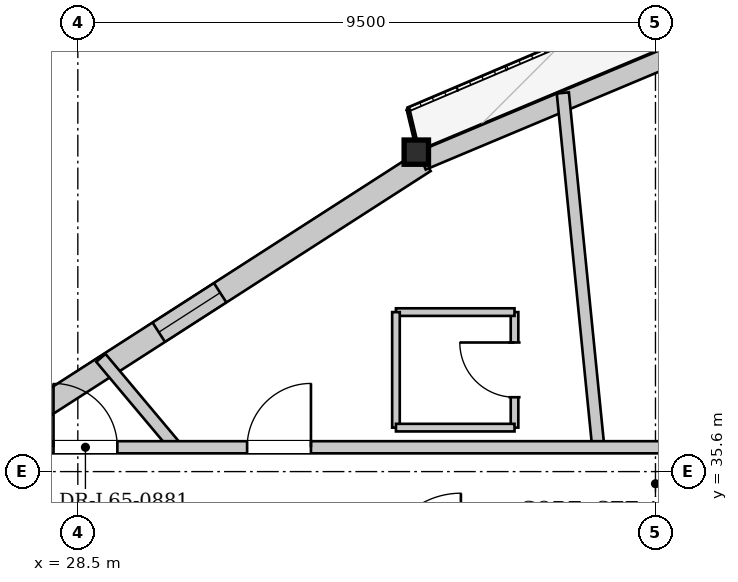
"""IFC4 building model, lengths in metres.
Left out: names, types, materials, properties, quantities, classifications, styles, units other than length and angle.
Written with IfcOpenShell. Run it as: python <this file> out.ifc"""

import sys

from ifc_helpers import new_model, si_unit, direction, frame, frame_2d, origin, origin_2d, place, context, subcontext, project, spatial, rectangle, i_section, extrude, source, transform, mapped, element, fill, save


model = new_model("IFC4")
c1 = context("Model", 3, precision=1e-05, world=origin(), true_north=direction((0.0, 1.0)))
c2 = subcontext(c1, "Body", "Model", "MODEL_VIEW")
j1 = project(units=[si_unit("LENGTHUNIT", "METRE"), si_unit("PLANEANGLEUNIT", "RADIAN")], contexts=[c1])
p1 = place(None, origin())
s1 = spatial("IfcSite", under=j1, at=p1, CompositionType="ELEMENT")
p2 = place(p1, origin())
s2 = spatial("IfcBuilding", under=s1, at=p2, CompositionType="ELEMENT")
p3 = place(p2, frame((0.0, 0.0, 245.3)))
s3 = spatial("IfcBuildingStorey", under=s2, at=p3, CompositionType="ELEMENT", Elevation=245.3)
m1 = source(origin(), c2, "Body", "SweptSolid", [
    extrude(i_section(OverallWidth=0.401, OverallDepth=0.399, WebThickness=0.022, FlangeThickness=0.034, at=origin_2d()), origin(), (0.0, 0.0, 1.0), 3.436),
])
p4 = place(p3, frame((34.098, 40.862, 0.0), z_axis=(-0.018120467412, -0.004974245956, 0.999823437182), x_axis=(0.264716981781, -0.964326147917, 0.0)))
e1 = element("IfcColumn", 1, at=p4, inside=s3, PredefinedType="COLUMN", context=c2, shape_type="MappedRepresentation", body=[
    mapped(m1, transform((0.0, 0.0, 0.0), x_axis=(1.0, 0.0, 0.0), y_axis=(0.0, 1.0, 0.0), z_axis=(0.0, 0.0, 1.0), scale=1.0)),
])
p5 = place(p3, frame((15.593, 28.735, 0.0), z_axis=(0.0, 0.0, 1.0), x_axis=(0.841061212788, 0.54093995632, 0.0)))
e2 = element("IfcWall", 2, at=p5, inside=s3, PredefinedType="SOLIDWALL", context=c2, shape_type="SweptSolid", body=[
    extrude(rectangle(XDim=22.124, YDim=0.38, at=frame_2d((11.062, 0.0))), origin(), (0.0, 0.0, 1.0), 2.872),
])
p6 = place(p5, frame((5.595, 0.0, 0.65)))
e3 = element("IfcOpeningElement", 3, at=p6, cuts=e2, PredefinedType="OPENING", context=c2, shape_type="SweptSolid", body=[
    extrude(rectangle(XDim=1.2, YDim=1.5, at=frame_2d((0.6, 0.75))), frame((0.0, 0.2, 0.0), z_axis=(0.0, -1.0, 0.0), x_axis=(1.0, 0.0, 0.0)), (0.0, 0.0, 1.0), 0.4),
])
p7 = place(p5, frame((16.929, 0.0, 0.65)))
e4 = element("IfcOpeningElement", 4, at=p7, cuts=e2, PredefinedType="OPENING", context=c2, shape_type="SweptSolid", body=[
    extrude(rectangle(XDim=1.2, YDim=1.5, at=frame_2d((0.6, 0.75))), frame((0.0, 0.2, 0.0), z_axis=(0.0, -1.0, 0.0), x_axis=(1.0, 0.0, 0.0)), (0.0, 0.0, 1.0), 0.4),
])
p8 = place(p3, frame((34.16, 40.715, 0.0), z_axis=(0.0, 0.0, 1.0), x_axis=(0.922135211304, 0.386867744937, 0.0)))
e5 = element("IfcWall", 5, at=p8, inside=s3, PredefinedType="SOLIDWALL", context=c2, shape_type="SweptSolid", body=[
    extrude(rectangle(XDim=22.124, YDim=0.32, at=frame_2d((11.062, 0.0))), origin(), (0.0, 0.0, 1.0), 2.872),
])
p9 = place(p8, frame((6.33, 0.0, 0.0)))
e6 = element("IfcOpeningElement", 6, at=p9, cuts=e5, PredefinedType="OPENING", context=c2, shape_type="SweptSolid", body=[
    extrude(rectangle(XDim=1.5, YDim=2.3, at=frame_2d((0.75, 1.15))), frame((0.0, 0.17, 0.0), z_axis=(0.0, -1.0, 0.0), x_axis=(1.0, 0.0, 0.0)), (0.0, 0.0, 1.0), 0.34),
])
p10 = place(p8, frame((17.272, 0.0, 0.402)))
e7 = element("IfcOpeningElement", 7, at=p10, cuts=e5, PredefinedType="OPENING", context=c2, shape_type="SweptSolid", body=[
    extrude(rectangle(XDim=2.6, YDim=2.35, at=frame_2d((1.3, 1.175))), frame((0.0, 0.17, 0.0), z_axis=(0.0, -1.0, 0.0), x_axis=(1.0, 0.0, 0.0)), (0.0, 0.0, 1.0), 0.34),
])
p11 = place(p3, frame((37.059, 36.0, 0.0), z_axis=(0.0, 0.0, 1.0), x_axis=(-0.099549120858, 0.99503264898, 0.0)))
e8 = element("IfcWall", 8, at=p11, inside=s3, PredefinedType="PARTITIONING", context=c2, shape_type="SweptSolid", body=[
    extrude(rectangle(XDim=5.856, YDim=0.2, at=frame_2d((2.928, 0.0))), origin(), (0.0, 0.0, 1.0), 3.38),
])
p12 = place(p3, frame((30.113, 36.0, 0.0), z_axis=(0.0, 0.0, 1.0), x_axis=(-0.642845923279, 0.765995508423, 0.0)))
e9 = element("IfcWall", 9, at=p12, inside=s3, PredefinedType="PARTITIONING", context=c2, shape_type="SweptSolid", body=[
    extrude(rectangle(XDim=1.919, YDim=0.2, at=frame_2d((0.959, 0.0))), origin(), (0.0, 0.0, 1.0), 3.38),
])
p13 = place(p3, frame((35.682, 36.323, 0.0), z_axis=(0.0, 0.0, 1.0), x_axis=(0.0, 1.0, 0.0)))
e10 = element("IfcWall", 10, at=p13, inside=s3, PredefinedType="PARTITIONING", context=c2, shape_type="SweptSolid", body=[
    extrude(rectangle(XDim=1.9, YDim=0.125, at=frame_2d((0.95, 0.0))), origin(), (0.0, 0.0, 1.0), 3.38),
])
p14 = place(p13, frame((0.5, 0.0, 0.0)))
e11 = element("IfcOpeningElement", 11, at=p14, cuts=e10, PredefinedType="OPENING", context=c2, shape_type="SweptSolid", body=[
    extrude(rectangle(XDim=0.9, YDim=2.1, at=frame_2d((0.45, 1.05))), frame((0.0, 0.073, 0.0), z_axis=(0.0, -1.0, 0.0), x_axis=(1.0, 0.0, 0.0)), (0.0, 0.0, 1.0), 0.145),
])
p15 = place(p3, frame((35.682, 38.223, 0.0), z_axis=(0.0, 0.0, 1.0), x_axis=(-1.0, 0.0, 0.0)))
e12 = element("IfcWall", 12, at=p15, inside=s3, PredefinedType="PARTITIONING", context=c2, shape_type="SweptSolid", body=[
    extrude(rectangle(XDim=1.95, YDim=0.125, at=frame_2d((0.975, 0.0))), origin(), (0.0, 0.0, 1.0), 3.125),
])
p16 = place(p3, frame((33.732, 38.223, 0.0), z_axis=(0.0, 0.0, 1.0), x_axis=(0.0, -1.0, 0.0)))
e13 = element("IfcWall", 13, at=p16, inside=s3, PredefinedType="PARTITIONING", context=c2, shape_type="SweptSolid", body=[
    extrude(rectangle(XDim=1.9, YDim=0.125, at=frame_2d((0.95, 0.0))), origin(), (0.0, 0.0, 1.0), 3.38),
])
p17 = place(p3, frame((33.732, 36.323, 0.0), z_axis=(0.0, 0.0, 1.0), x_axis=(1.0, 0.0, 0.0)))
e14 = element("IfcWall", 14, at=p17, inside=s3, PredefinedType="PARTITIONING", context=c2, shape_type="SweptSolid", body=[
    extrude(rectangle(XDim=1.95, YDim=0.125, at=frame_2d((0.975, 0.0))), origin(), (0.0, 0.0, 1.0), 3.38),
])
p18 = place(p3, frame((27.8, 36.0, 0.0), z_axis=(0.0, 0.0, 1.0), x_axis=(1.0, 0.0, 0.0)))
e15 = element("IfcWall", 15, at=p18, inside=s3, PredefinedType="PARTITIONING", context=c2, shape_type="SweptSolid", body=[
    extrude(rectangle(XDim=13.2, YDim=0.2, at=frame_2d((6.6, 0.0))), origin(), (0.0, 0.0, 1.0), 3.38),
])
p19 = place(p18, frame((3.484, 0.0, 0.0)))
e16 = element("IfcOpeningElement", 16, at=p19, cuts=e15, PredefinedType="OPENING", context=c2, shape_type="SweptSolid", body=[
    extrude(rectangle(XDim=1.05, YDim=2.2, at=frame_2d((0.525, 1.1))), frame((0.0, 0.11, 0.0), z_axis=(0.0, -1.0, 0.0), x_axis=(1.0, 0.0, 0.0)), (0.0, 0.0, 1.0), 0.22),
])
p20 = place(p18, frame((0.3, 0.0, 0.0)))
e17 = element("IfcOpeningElement", 17, at=p20, cuts=e15, PredefinedType="OPENING", context=c2, shape_type="SweptSolid", body=[
    extrude(rectangle(XDim=1.05, YDim=2.2, at=frame_2d((0.525, 1.1))), frame((0.0, 0.11, 0.0), z_axis=(0.0, -1.0, 0.0), x_axis=(1.0, 0.0, 0.0)), (0.0, 0.0, 1.0), 0.22),
])
m2 = source(origin(), c2, "Body", "SweptSolid", [
    extrude(rectangle(XDim=1.2, YDim=1.5, at=frame_2d((0.6, 0.75))), frame((0.0, 0.03, 0.0), z_axis=(0.0, -1.0, 0.0), x_axis=(1.0, 0.0, 0.0)), (0.0, 0.0, 1.0), 0.06),
])
p21 = place(p7, origin())
e18 = element("IfcWindow", 18, at=p21, inside=s3, PartitioningType="SINGLE_PANEL", PredefinedType="WINDOW", context=c2, shape_type="MappedRepresentation", body=[
    mapped(m2, transform((0.0, 0.0, 0.0), x_axis=(1.0, 0.0, 0.0), y_axis=(0.0, 1.0, 0.0), z_axis=(0.0, 0.0, 1.0), scale=1.0)),
])
fill(e4, e18)
m3 = source(origin(), c2, "Body", "SweptSolid", [
    extrude(rectangle(XDim=0.9, YDim=2.1, at=frame_2d((0.45, 1.05))), frame((0.0, 0.025, 0.0), z_axis=(0.0, -1.0, 0.0), x_axis=(1.0, 0.0, 0.0)), (0.0, 0.0, 1.0), 0.05),
])
p22 = place(p14, origin())
e19 = element("IfcDoor", 19, at=p22, inside=s3, OperationType="SINGLE_SWING_RIGHT", PredefinedType="DOOR", context=c2, shape_type="MappedRepresentation", body=[
    mapped(m3, transform((0.0, 0.0, 0.0), x_axis=(1.0, 0.0, 0.0), y_axis=(0.0, 1.0, 0.0), z_axis=(0.0, 0.0, 1.0), scale=1.0)),
])
fill(e11, e19)
m4 = source(origin(), c2, "Body", "SweptSolid", [
    extrude(rectangle(XDim=1.05, YDim=2.2, at=frame_2d((0.525, 1.1))), frame((0.0, 0.025, 0.0), z_axis=(0.0, -1.0, 0.0), x_axis=(1.0, 0.0, 0.0)), (0.0, 0.0, 1.0), 0.05),
])
p23 = place(p19, origin())
e20 = element("IfcDoor", 20, at=p23, inside=s3, OperationType="SINGLE_SWING_RIGHT", PredefinedType="DOOR", context=c2, shape_type="MappedRepresentation", body=[
    mapped(m4, transform((0.0, 0.0, 0.0), x_axis=(1.0, 0.0, 0.0), y_axis=(0.0, 1.0, 0.0), z_axis=(0.0, 0.0, 1.0), scale=1.0)),
])
fill(e16, e20)
p24 = place(p20, origin())
e21 = element("IfcDoor", 21, at=p24, inside=s3, OperationType="SINGLE_SWING_LEFT", PredefinedType="DOOR", context=c2, shape_type="MappedRepresentation", body=[
    mapped(m4, transform((0.0, 0.0, 0.0), x_axis=(1.0, 0.0, 0.0), y_axis=(0.0, 1.0, 0.0), z_axis=(0.0, 0.0, 1.0), scale=1.0)),
])
fill(e17, e21)
save(model, sys.argv[1])
